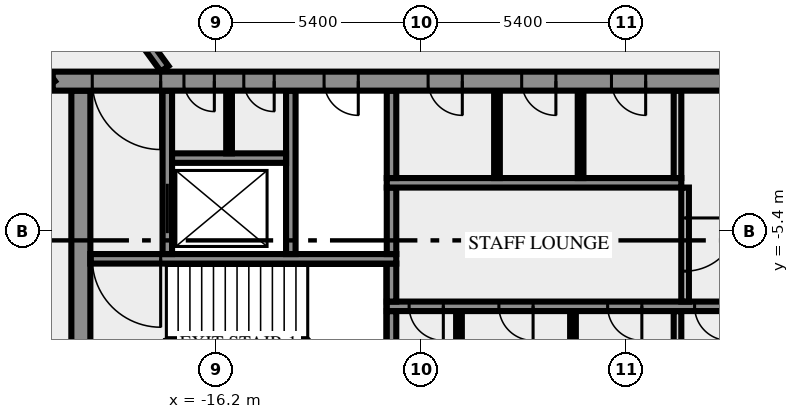
"""IFC4 building model, lengths in metres.
Left out: names, types, materials, properties, quantities, classifications, styles, units other than length and angle.
Written with IfcOpenShell. Run it as: python <this file> out.ifc"""

import sys

from ifc_helpers import new_model, si_unit, direction, frame, frame_2d, origin, place, context, subcontext, project, spatial, rectangle, extrude, element, fill, save


model = new_model("IFC4")
c1 = context("Model", 3, precision=1e-05, world=origin(), true_north=direction((0.0, 1.0)))
c2 = subcontext(c1, "Body", "Model", "MODEL_VIEW")
j1 = project(units=[si_unit("LENGTHUNIT", "METRE"), si_unit("PLANEANGLEUNIT", "RADIAN")], contexts=[c1])
p1 = place(None, origin())
s1 = spatial("IfcSite", under=j1, at=p1, CompositionType="ELEMENT")
p2 = place(p1, origin())
s2 = spatial("IfcBuilding", under=s1, at=p2, CompositionType="ELEMENT")
p3 = place(p2, frame((0.0, 0.0, 218.0)))
s3 = spatial("IfcBuildingStorey", under=s2, at=p3, CompositionType="ELEMENT", Elevation=218.0)
p4 = place(p3, frame((-19.75, -10.5, 0.0), z_axis=(0.0, 0.0, 1.0), x_axis=(0.0, 1.0, 0.0)))
e1 = element("IfcWall", 1, at=p4, inside=s3, PredefinedType="SHEAR", context=c2, shape_type="SweptSolid", body=[
    extrude(rectangle(XDim=8.8, YDim=0.5, at=frame_2d((4.4, 0.0))), origin(), (0.0, 0.0, 1.0), 3.65),
])
p5 = place(p3, frame((-11.575, -10.5, 0.0), z_axis=(0.0, 0.0, 1.0), x_axis=(0.0, 1.0, 0.0)))
e2 = element("IfcWall", 2, at=p5, inside=s3, PredefinedType="SHEAR", context=c2, shape_type="SweptSolid", body=[
    extrude(rectangle(XDim=3.0, YDim=0.25, at=frame_2d((1.5, 0.0))), origin(), (0.0, 0.0, 1.0), 3.65),
])
for number, where, z_axis, x_axis in (
    (3, (-9.8, -10.5, 0.0), (0.0, 0.0, 1.0), (0.0, 1.0, 0.0)),
    (4, (-6.8, -10.5, 0.0), (0.0, 0.0, 1.0), (0.0, 1.0, 0.0)),
):
    element("IfcWall", number, at=place(p3, frame(where, z_axis=z_axis, x_axis=x_axis)), inside=s3, PredefinedType="PARTITIONING", context=c2, shape_type="SweptSolid", body=[
        extrude(rectangle(XDim=3.0, YDim=0.15, at=frame_2d((1.5, 0.0))), origin(), (0.0, 0.0, 1.0), 3.65),
    ])
p6 = place(p3, frame((-4.05, -10.5, 0.0), z_axis=(0.0, 0.0, 1.0), x_axis=(0.0, 1.0, 0.0)))
e5 = element("IfcWall", 5, at=p6, inside=s3, PredefinedType="SOLIDWALL", context=c2, shape_type="SweptSolid", body=[
    extrude(rectangle(XDim=3.0, YDim=0.2, at=frame_2d((1.5, 0.0))), origin(), (0.0, 0.0, 1.0), 3.65),
])
p7 = place(p3, frame((11.7, -7.375, 0.0), z_axis=(0.0, 0.0, 1.0), x_axis=(-1.0, 0.0, 0.0)))
e6 = element("IfcWall", 6, at=p7, inside=s3, PredefinedType="SHEAR", context=c2, shape_type="SweptSolid", body=[
    extrude(rectangle(XDim=23.4, YDim=0.25, at=frame_2d((11.7, 0.0))), origin(), (0.0, 0.0, 1.0), 3.65),
])
p8 = place(p7, frame((21.912, 0.0, 0.0)))
e7 = element("IfcOpeningElement", 7, at=p8, cuts=e6, PredefinedType="OPENING", context=c2, shape_type="SweptSolid", body=[
    extrude(rectangle(XDim=0.9, YDim=2.1, at=frame_2d((0.45, 1.05))), frame((0.0, 0.135, 0.0), z_axis=(0.0, -1.0, 0.0), x_axis=(1.0, 0.0, 0.0)), (0.0, 0.0, 1.0), 0.27),
])
p9 = place(p7, frame((19.55, 0.0, 0.0)))
e8 = element("IfcOpeningElement", 8, at=p9, cuts=e6, PredefinedType="OPENING", context=c2, shape_type="SweptSolid", body=[
    extrude(rectangle(XDim=0.9, YDim=2.1, at=frame_2d((0.45, 1.05))), frame((0.0, 0.135, 0.0), z_axis=(0.0, -1.0, 0.0), x_axis=(1.0, 0.0, 0.0)), (0.0, 0.0, 1.0), 0.27),
])
p10 = place(p7, frame((16.688, 0.0, 0.0)))
e9 = element("IfcOpeningElement", 9, at=p10, cuts=e6, PredefinedType="OPENING", context=c2, shape_type="SweptSolid", body=[
    extrude(rectangle(XDim=0.9, YDim=2.1, at=frame_2d((0.45, 1.05))), frame((0.0, 0.135, 0.0), z_axis=(0.0, -1.0, 0.0), x_axis=(1.0, 0.0, 0.0)), (0.0, 0.0, 1.0), 0.27),
])
p11 = place(p7, frame((14.4, 0.0, 0.0)))
e10 = element("IfcOpeningElement", 10, at=p11, cuts=e6, PredefinedType="OPENING", context=c2, shape_type="SweptSolid", body=[
    extrude(rectangle(XDim=0.9, YDim=2.1, at=frame_2d((0.45, 1.05))), frame((0.0, 0.135, 0.0), z_axis=(0.0, -1.0, 0.0), x_axis=(1.0, 0.0, 0.0)), (0.0, 0.0, 1.0), 0.27),
])
p12 = place(p7, frame((12.5, 0.0, 0.0)))
e11 = element("IfcOpeningElement", 11, at=p12, cuts=e6, PredefinedType="OPENING", context=c2, shape_type="SweptSolid", body=[
    extrude(rectangle(XDim=0.9, YDim=2.1, at=frame_2d((0.45, 1.05))), frame((0.0, 0.135, 0.0), z_axis=(0.0, -1.0, 0.0), x_axis=(1.0, 0.0, 0.0)), (0.0, 0.0, 1.0), 0.27),
])
p13 = place(p7, frame((10.6, 0.0, 0.0)))
e12 = element("IfcOpeningElement", 12, at=p13, cuts=e6, PredefinedType="OPENING", context=c2, shape_type="SweptSolid", body=[
    extrude(rectangle(XDim=0.9, YDim=2.1, at=frame_2d((0.45, 1.05))), frame((0.0, 0.135, 0.0), z_axis=(0.0, -1.0, 0.0), x_axis=(1.0, 0.0, 0.0)), (0.0, 0.0, 1.0), 0.27),
])
p14 = place(p7, frame((8.35, 0.0, 0.0)))
e13 = element("IfcOpeningElement", 13, at=p14, cuts=e6, PredefinedType="OPENING", context=c2, shape_type="SweptSolid", body=[
    extrude(rectangle(XDim=1.1, YDim=2.1, at=frame_2d((0.55, 1.05))), frame((0.0, 0.135, 0.0), z_axis=(0.0, -1.0, 0.0), x_axis=(1.0, 0.0, 0.0)), (0.0, 0.0, 1.0), 0.27),
])
p15 = place(p7, frame((5.85, 0.0, 0.0)))
e14 = element("IfcOpeningElement", 14, at=p15, cuts=e6, PredefinedType="OPENING", context=c2, shape_type="SweptSolid", body=[
    extrude(rectangle(XDim=1.1, YDim=2.1, at=frame_2d((0.55, 1.05))), frame((0.0, 0.135, 0.0), z_axis=(0.0, -1.0, 0.0), x_axis=(1.0, 0.0, 0.0)), (0.0, 0.0, 1.0), 0.27),
])
p16 = place(p7, frame((3.35, 0.0, 0.0)))
e15 = element("IfcOpeningElement", 15, at=p16, cuts=e6, PredefinedType="OPENING", context=c2, shape_type="SweptSolid", body=[
    extrude(rectangle(XDim=1.1, YDim=2.1, at=frame_2d((0.55, 1.05))), frame((0.0, 0.135, 0.0), z_axis=(0.0, -1.0, 0.0), x_axis=(1.0, 0.0, 0.0)), (0.0, 0.0, 1.0), 0.27),
])
p17 = place(p7, frame((0.85, 0.0, 0.0)))
e16 = element("IfcOpeningElement", 16, at=p17, cuts=e6, PredefinedType="OPENING", context=c2, shape_type="SweptSolid", body=[
    extrude(rectangle(XDim=1.1, YDim=2.1, at=frame_2d((0.55, 1.05))), frame((0.0, 0.135, 0.0), z_axis=(0.0, -1.0, 0.0), x_axis=(1.0, 0.0, 0.0)), (0.0, 0.0, 1.0), 0.27),
])
p18 = place(p3, frame((-11.575, -7.25, 0.0), z_axis=(0.0, 0.0, 1.0), x_axis=(0.0, 1.0, 0.0)))
e17 = element("IfcWall", 17, at=p18, inside=s3, PredefinedType="SHEAR", context=c2, shape_type="SweptSolid", body=[
    extrude(rectangle(XDim=1.0, YDim=0.25, at=frame_2d((0.5, 0.0))), origin(), (0.0, 0.0, 1.0), 3.65),
])
p19 = place(p3, frame((-3.85, -4.25, 0.0), z_axis=(0.0, 0.0, 1.0), x_axis=(0.0, -1.0, 0.0)))
e18 = element("IfcWall", 18, at=p19, inside=s3, PredefinedType="SOLIDWALL", context=c2, shape_type="SweptSolid", body=[
    extrude(rectangle(XDim=3.0, YDim=0.2, at=frame_2d((1.5, 0.0))), origin(), (0.0, 0.0, 1.0), 3.65),
])
p20 = place(p19, frame((0.8, 0.0, 0.0)))
e19 = element("IfcOpeningElement", 19, at=p20, cuts=e18, PredefinedType="OPENING", context=c2, shape_type="SweptSolid", body=[
    extrude(rectangle(XDim=1.4, YDim=2.1, at=frame_2d((0.7, 1.05))), frame((0.0, 0.11, 0.0), z_axis=(0.0, -1.0, 0.0), x_axis=(1.0, 0.0, 0.0)), (0.0, 0.0, 1.0), 0.22),
])
p21 = place(p3, frame((-11.45, -6.125, 0.0), z_axis=(0.0, 0.0, 1.0), x_axis=(-1.0, 0.0, 0.0)))
e20 = element("IfcWall", 20, at=p21, inside=s3, PredefinedType="SHEAR", context=c2, shape_type="SweptSolid", body=[
    extrude(rectangle(XDim=8.05, YDim=0.25, at=frame_2d((4.025, 0.0))), origin(), (0.0, 0.0, 1.0), 3.65),
])
p22 = place(p21, frame((6.2, 0.0, 0.0)))
e21 = element("IfcOpeningElement", 21, at=p22, cuts=e20, PredefinedType="OPENING", context=c2, shape_type="SweptSolid", body=[
    extrude(rectangle(XDim=1.8, YDim=2.1, at=frame_2d((0.9, 1.05))), frame((0.0, 0.135, 0.0), z_axis=(0.0, -1.0, 0.0), x_axis=(1.0, 0.0, 0.0)), (0.0, 0.0, 1.0), 0.27),
])
p23 = place(p3, frame((-17.475, -6.0, 0.0), z_axis=(0.0, 0.0, 1.0), x_axis=(0.0, 1.0, 0.0)))
e22 = element("IfcWall", 22, at=p23, inside=s3, PredefinedType="SHEAR", context=c2, shape_type="SweptSolid", body=[
    extrude(rectangle(XDim=4.3, YDim=0.25, at=frame_2d((2.15, 0.0))), origin(), (0.0, 0.0, 1.0), 3.65),
])
p24 = place(p23, frame((0.55, 0.0, 0.0)))
e23 = element("IfcOpeningElement", 23, at=p24, cuts=e22, PredefinedType="OPENING", context=c2, shape_type="SweptSolid", body=[
    extrude(rectangle(XDim=1.3, YDim=2.1, at=frame_2d((0.65, 1.05))), frame((0.0, 0.135, 0.0), z_axis=(0.0, -1.0, 0.0), x_axis=(1.0, 0.0, 0.0)), (0.0, 0.0, 1.0), 0.27),
])
p25 = place(p3, frame((-14.225, -6.0, 0.0), z_axis=(0.0, 0.0, 1.0), x_axis=(0.0, 1.0, 0.0)))
e24 = element("IfcWall", 24, at=p25, inside=s3, PredefinedType="SHEAR", context=c2, shape_type="SweptSolid", body=[
    extrude(rectangle(XDim=4.3, YDim=0.25, at=frame_2d((2.15, 0.0))), origin(), (0.0, 0.0, 1.0), 3.65),
])
p26 = place(p3, frame((-11.575, -6.0, 0.0), z_axis=(0.0, 0.0, 1.0), x_axis=(0.0, 1.0, 0.0)))
e25 = element("IfcWall", 25, at=p26, inside=s3, PredefinedType="SHEAR", context=c2, shape_type="SweptSolid", body=[
    extrude(rectangle(XDim=1.75, YDim=0.25, at=frame_2d((0.875, 0.0))), origin(), (0.0, 0.0, 1.0), 3.65),
])
p27 = place(p3, frame((-11.7, -4.125, 0.0), z_axis=(0.0, 0.0, 1.0), x_axis=(1.0, 0.0, 0.0)))
e26 = element("IfcWall", 26, at=p27, inside=s3, PredefinedType="SHEAR", context=c2, shape_type="SweptSolid", body=[
    extrude(rectangle(XDim=7.75, YDim=0.25, at=frame_2d((3.875, 0.0))), origin(), (0.0, 0.0, 1.0), 3.65),
])
p28 = place(p3, frame((-11.575, -4.0, 0.0), z_axis=(0.0, 0.0, 1.0), x_axis=(0.0, 1.0, 0.0)))
e27 = element("IfcWall", 27, at=p28, inside=s3, PredefinedType="SHEAR", context=c2, shape_type="SweptSolid", body=[
    extrude(rectangle(XDim=2.3, YDim=0.25, at=frame_2d((1.15, 0.0))), origin(), (0.0, 0.0, 1.0), 3.65),
])
for number, where, z_axis, x_axis in (
    (28, (-8.8, -4.0, 0.0), (0.0, 0.0, 1.0), (0.0, 1.0, 0.0)),
    (29, (-6.6, -4.0, 0.0), (0.0, 0.0, 1.0), (0.0, 1.0, 0.0)),
):
    element("IfcWall", number, at=place(p3, frame(where, z_axis=z_axis, x_axis=x_axis)), inside=s3, PredefinedType="PARTITIONING", context=c2, shape_type="SweptSolid", body=[
        extrude(rectangle(XDim=2.3, YDim=0.15, at=frame_2d((1.15, 0.0))), origin(), (0.0, 0.0, 1.0), 3.65),
    ])
p29 = place(p3, frame((-4.05, -4.0, 0.0), z_axis=(0.0, 0.0, 1.0), x_axis=(0.0, 1.0, 0.0)))
e30 = element("IfcWall", 30, at=p29, inside=s3, PredefinedType="SOLIDWALL", context=c2, shape_type="SweptSolid", body=[
    extrude(rectangle(XDim=2.3, YDim=0.2, at=frame_2d((1.15, 0.0))), origin(), (0.0, 0.0, 1.0), 3.65),
])
p30 = place(p3, frame((-17.35, -3.475, 0.0), z_axis=(0.0, 0.0, 1.0), x_axis=(1.0, 0.0, 0.0)))
e31 = element("IfcWall", 31, at=p30, inside=s3, PredefinedType="SHEAR", context=c2, shape_type="SweptSolid", body=[
    extrude(rectangle(XDim=3.0, YDim=0.25, at=frame_2d((1.5, 0.0))), origin(), (0.0, 0.0, 1.0), 3.65),
])
p31 = place(p3, frame((-15.85, -3.35, 0.0), z_axis=(0.0, 0.0, 1.0), x_axis=(0.0, 1.0, 0.0)))
e32 = element("IfcWall", 32, at=p31, inside=s3, PredefinedType="PARTITIONING", context=c2, shape_type="SweptSolid", body=[
    extrude(rectangle(XDim=1.65, YDim=0.15, at=frame_2d((0.825, 0.0))), origin(), (0.0, 0.0, 1.0), 3.65),
])
p32 = place(p3, frame((20.49, -1.45, 0.0), z_axis=(0.0, 0.0, 1.0), x_axis=(-1.0, 0.0, 0.0)))
e33 = element("IfcWall", 33, at=p32, inside=s3, PredefinedType="SHEAR", context=c2, shape_type="SweptSolid", body=[
    extrude(rectangle(XDim=40.98, YDim=0.5, at=frame_2d((20.49, 0.0))), origin(), (0.0, 0.0, 1.0), 3.65),
])
p33 = place(p32, frame((38.14, 0.0, 0.0)))
e34 = element("IfcOpeningElement", 34, at=p33, cuts=e33, PredefinedType="OPENING", context=c2, shape_type="SweptSolid", body=[
    extrude(rectangle(XDim=1.8, YDim=2.1, at=frame_2d((0.9, 1.05))), frame((0.0, 0.26, 0.0), z_axis=(0.0, -1.0, 0.0), x_axis=(1.0, 0.0, 0.0)), (0.0, 0.0, 1.0), 0.52),
])
p34 = place(p32, frame((36.728, 0.0, 0.0)))
e35 = element("IfcOpeningElement", 35, at=p34, cuts=e33, PredefinedType="OPENING", context=c2, shape_type="SweptSolid", body=[
    extrude(rectangle(XDim=0.8, YDim=2.1, at=frame_2d((0.4, 1.05))), frame((0.0, 0.26, 0.0), z_axis=(0.0, -1.0, 0.0), x_axis=(1.0, 0.0, 0.0)), (0.0, 0.0, 1.0), 0.52),
])
p35 = place(p32, frame((35.153, 0.0, 0.0)))
e36 = element("IfcOpeningElement", 36, at=p35, cuts=e33, PredefinedType="OPENING", context=c2, shape_type="SweptSolid", body=[
    extrude(rectangle(XDim=0.8, YDim=2.1, at=frame_2d((0.4, 1.05))), frame((0.0, 0.26, 0.0), z_axis=(0.0, -1.0, 0.0), x_axis=(1.0, 0.0, 0.0)), (0.0, 0.0, 1.0), 0.52),
])
p36 = place(p32, frame((32.94, 0.0, 0.0)))
e37 = element("IfcOpeningElement", 37, at=p36, cuts=e33, PredefinedType="OPENING", context=c2, shape_type="SweptSolid", body=[
    extrude(rectangle(XDim=0.9, YDim=2.1, at=frame_2d((0.45, 1.05))), frame((0.0, 0.26, 0.0), z_axis=(0.0, -1.0, 0.0), x_axis=(1.0, 0.0, 0.0)), (0.0, 0.0, 1.0), 0.52),
])
p37 = place(p32, frame((30.202, 0.0, 0.0)))
e38 = element("IfcOpeningElement", 38, at=p37, cuts=e33, PredefinedType="OPENING", context=c2, shape_type="SweptSolid", body=[
    extrude(rectangle(XDim=0.9, YDim=2.1, at=frame_2d((0.45, 1.05))), frame((0.0, 0.26, 0.0), z_axis=(0.0, -1.0, 0.0), x_axis=(1.0, 0.0, 0.0)), (0.0, 0.0, 1.0), 0.52),
])
p38 = place(p32, frame((27.74, 0.0, 0.0)))
e39 = element("IfcOpeningElement", 39, at=p38, cuts=e33, PredefinedType="OPENING", context=c2, shape_type="SweptSolid", body=[
    extrude(rectangle(XDim=0.9, YDim=2.1, at=frame_2d((0.45, 1.05))), frame((0.0, 0.26, 0.0), z_axis=(0.0, -1.0, 0.0), x_axis=(1.0, 0.0, 0.0)), (0.0, 0.0, 1.0), 0.52),
])
p39 = place(p32, frame((25.377, 0.0, 0.0)))
e40 = element("IfcOpeningElement", 40, at=p39, cuts=e33, PredefinedType="OPENING", context=c2, shape_type="SweptSolid", body=[
    extrude(rectangle(XDim=0.9, YDim=2.1, at=frame_2d((0.45, 1.05))), frame((0.0, 0.26, 0.0), z_axis=(0.0, -1.0, 0.0), x_axis=(1.0, 0.0, 0.0)), (0.0, 0.0, 1.0), 0.52),
])
p40 = place(p32, frame((20.74, 0.0, 0.0)))
e41 = element("IfcOpeningElement", 41, at=p40, cuts=e33, PredefinedType="OPENING", context=c2, shape_type="SweptSolid", body=[
    extrude(rectangle(XDim=2.0, YDim=2.1, at=frame_2d((1.0, 1.05))), frame((0.0, 0.26, 0.0), z_axis=(0.0, -1.0, 0.0), x_axis=(1.0, 0.0, 0.0)), (0.0, 0.0, 1.0), 0.52),
])
p41 = place(p32, frame((7.14, 0.0, 0.0)))
e42 = element("IfcOpeningElement", 42, at=p41, cuts=e33, PredefinedType="OPENING", context=c2, shape_type="SweptSolid", body=[
    extrude(rectangle(XDim=0.9, YDim=2.1, at=frame_2d((0.45, 1.05))), frame((0.0, 0.26, 0.0), z_axis=(0.0, -1.0, 0.0), x_axis=(1.0, 0.0, 0.0)), (0.0, 0.0, 1.0), 0.52),
])
p42 = place(p32, frame((4.19, 0.0, 0.0)))
e43 = element("IfcOpeningElement", 43, at=p42, cuts=e33, PredefinedType="OPENING", context=c2, shape_type="SweptSolid", body=[
    extrude(rectangle(XDim=0.9, YDim=2.1, at=frame_2d((0.45, 1.05))), frame((0.0, 0.26, 0.0), z_axis=(0.0, -1.0, 0.0), x_axis=(1.0, 0.0, 0.0)), (0.0, 0.0, 1.0), 0.52),
])
p43 = place(p32, frame((1.04, 0.0, 0.0)))
e44 = element("IfcOpeningElement", 44, at=p43, cuts=e33, PredefinedType="OPENING", context=c2, shape_type="SweptSolid", body=[
    extrude(rectangle(XDim=1.8, YDim=2.1, at=frame_2d((0.9, 1.05))), frame((0.0, 0.26, 0.0), z_axis=(0.0, -1.0, 0.0), x_axis=(1.0, 0.0, 0.0)), (0.0, 0.0, 1.0), 0.52),
])
p44 = place(p3, frame((-20.531, -1.523, 0.0), z_axis=(0.0, 0.0, 1.0), x_axis=(-0.587784239999, 0.809017729849, 0.0)))
e45 = element("IfcWall", 45, at=p44, inside=s3, PredefinedType="SOLIDWALL", context=c2, shape_type="SweptSolid", body=[
    extrude(rectangle(XDim=23.271, YDim=0.25, at=frame_2d((11.635, 0.0))), origin(), (0.0, 0.0, 1.0), 3.65),
])
p45 = place(p44, frame((0.533, 0.0, 0.0)))
e46 = element("IfcOpeningElement", 46, at=p45, cuts=e45, PredefinedType="OPENING", context=c2, shape_type="SweptSolid", body=[
    extrude(rectangle(XDim=0.9, YDim=2.1, at=frame_2d((0.45, 1.05))), frame((0.0, 0.135, 0.0), z_axis=(0.0, -1.0, 0.0), x_axis=(1.0, 0.0, 0.0)), (0.0, 0.0, 1.0), 0.27),
])
p46 = place(p44, frame((17.106, 0.0, 0.0)))
e47 = element("IfcOpeningElement", 47, at=p46, cuts=e45, PredefinedType="OPENING", context=c2, shape_type="SweptSolid", body=[
    extrude(rectangle(XDim=1.8, YDim=2.1, at=frame_2d((0.9, 1.05))), frame((0.0, 0.135, 0.0), z_axis=(0.0, -1.0, 0.0), x_axis=(1.0, 0.0, 0.0)), (0.0, 0.0, 1.0), 0.27),
])
p47 = place(p44, frame((10.516, 0.0, 0.0)))
e48 = element("IfcOpeningElement", 48, at=p47, cuts=e45, PredefinedType="OPENING", context=c2, shape_type="SweptSolid", body=[
    extrude(rectangle(XDim=0.9, YDim=2.1, at=frame_2d((0.45, 1.05))), frame((0.0, 0.135, 0.0), z_axis=(0.0, -1.0, 0.0), x_axis=(1.0, 0.0, 0.0)), (0.0, 0.0, 1.0), 0.27),
])
p48 = place(p3, frame((-31.918, 18.658, 0.0), z_axis=(0.0, 0.0, 1.0), x_axis=(0.587788731405, -0.80901446664, 0.0)))
e49 = element("IfcWall", 49, at=p48, inside=s3, PredefinedType="SOLIDWALL", context=c2, shape_type="SweptSolid", body=[
    extrude(rectangle(XDim=24.453, YDim=0.25, at=frame_2d((12.227, 0.0))), origin(), (0.0, 0.0, 1.0), 3.65),
])
p49 = place(p48, frame((8.395, 0.0, 0.0)))
e50 = element("IfcOpeningElement", 50, at=p49, cuts=e49, PredefinedType="OPENING", context=c2, shape_type="SweptSolid", body=[
    extrude(rectangle(XDim=1.0, YDim=2.1, at=frame_2d((0.5, 1.05))), frame((0.0, 0.135, 0.0), z_axis=(0.0, -1.0, 0.0), x_axis=(1.0, 0.0, 0.0)), (0.0, 0.0, 1.0), 0.27),
])
p50 = place(p48, frame((10.095, 0.0, 0.0)))
e51 = element("IfcOpeningElement", 51, at=p50, cuts=e49, PredefinedType="OPENING", context=c2, shape_type="SweptSolid", body=[
    extrude(rectangle(XDim=0.9, YDim=2.1, at=frame_2d((0.45, 1.05))), frame((0.0, 0.135, 0.0), z_axis=(0.0, -1.0, 0.0), x_axis=(1.0, 0.0, 0.0)), (0.0, 0.0, 1.0), 0.27),
])
p51 = place(p8, origin())
e52 = element("IfcDoor", 52, at=p51, inside=s3, OperationType="SINGLE_SWING_RIGHT", PredefinedType="DOOR", context=c2, shape_type="SweptSolid", body=[
    extrude(rectangle(XDim=0.9, YDim=2.1, at=frame_2d((0.45, 1.05))), frame((0.0, 0.025, 0.0), z_axis=(0.0, -1.0, 0.0), x_axis=(1.0, 0.0, 0.0)), (0.0, 0.0, 1.0), 0.05),
])
fill(e7, e52)
p52 = place(p9, origin())
e53 = element("IfcDoor", 53, at=p52, inside=s3, OperationType="SINGLE_SWING_RIGHT", PredefinedType="DOOR", context=c2, shape_type="SweptSolid", body=[
    extrude(rectangle(XDim=0.9, YDim=2.1, at=frame_2d((0.45, 1.05))), frame((0.0, 0.025, 0.0), z_axis=(0.0, -1.0, 0.0), x_axis=(1.0, 0.0, 0.0)), (0.0, 0.0, 1.0), 0.05),
])
fill(e8, e53)
p53 = place(p10, origin())
e54 = element("IfcDoor", 54, at=p53, inside=s3, OperationType="SINGLE_SWING_RIGHT", PredefinedType="DOOR", context=c2, shape_type="SweptSolid", body=[
    extrude(rectangle(XDim=0.9, YDim=2.1, at=frame_2d((0.45, 1.05))), frame((0.0, 0.025, 0.0), z_axis=(0.0, -1.0, 0.0), x_axis=(1.0, 0.0, 0.0)), (0.0, 0.0, 1.0), 0.05),
])
fill(e9, e54)
p54 = place(p11, origin())
e55 = element("IfcDoor", 55, at=p54, inside=s3, OperationType="SINGLE_SWING_RIGHT", PredefinedType="DOOR", context=c2, shape_type="SweptSolid", body=[
    extrude(rectangle(XDim=0.9, YDim=2.1, at=frame_2d((0.45, 1.05))), frame((0.0, 0.025, 0.0), z_axis=(0.0, -1.0, 0.0), x_axis=(1.0, 0.0, 0.0)), (0.0, 0.0, 1.0), 0.05),
])
fill(e10, e55)
p55 = place(p20, origin())
e56 = element("IfcDoor", 56, at=p55, inside=s3, OperationType="DOUBLE_DOOR_SINGLE_SWING", PredefinedType="DOOR", context=c2, shape_type="SweptSolid", body=[
    extrude(rectangle(XDim=1.4, YDim=2.1, at=frame_2d((0.7, 1.05))), frame((0.0, 0.025, 0.0), z_axis=(0.0, -1.0, 0.0), x_axis=(1.0, 0.0, 0.0)), (0.0, 0.0, 1.0), 0.05),
])
fill(e19, e56)
p56 = place(p22, origin())
e57 = element("IfcDoor", 57, at=p56, inside=s3, OperationType="DOUBLE_DOOR_SINGLE_SWING", PredefinedType="DOOR", context=c2, shape_type="SweptSolid", body=[
    extrude(rectangle(XDim=1.8, YDim=2.1, at=frame_2d((0.9, 1.05))), frame((0.0, 0.025, 0.0), z_axis=(0.0, -1.0, 0.0), x_axis=(1.0, 0.0, 0.0)), (0.0, 0.0, 1.0), 0.05),
])
fill(e21, e57)
p57 = place(p24, origin())
e58 = element("IfcDoor", 58, at=p57, inside=s3, OperationType="DOUBLE_DOOR_SLIDING", PredefinedType="DOOR", context=c2, shape_type="SweptSolid", body=[
    extrude(rectangle(XDim=1.3, YDim=2.1, at=frame_2d((0.65, 1.05))), frame((0.0, 0.025, 0.0), z_axis=(0.0, -1.0, 0.0), x_axis=(1.0, 0.0, 0.0)), (0.0, 0.0, 1.0), 0.05),
])
fill(e23, e58)
p58 = place(p33, origin())
e59 = element("IfcDoor", 59, at=p58, inside=s3, OperationType="DOUBLE_DOOR_SINGLE_SWING", PredefinedType="DOOR", context=c2, shape_type="SweptSolid", body=[
    extrude(rectangle(XDim=1.8, YDim=2.1, at=frame_2d((0.9, 1.05))), frame((0.0, 0.025, 0.0), z_axis=(0.0, -1.0, 0.0), x_axis=(1.0, 0.0, 0.0)), (0.0, 0.0, 1.0), 0.05),
])
fill(e34, e59)
p59 = place(p34, origin())
e60 = element("IfcDoor", 60, at=p59, inside=s3, OperationType="SINGLE_SWING_RIGHT", PredefinedType="DOOR", context=c2, shape_type="SweptSolid", body=[
    extrude(rectangle(XDim=0.8, YDim=2.1, at=frame_2d((0.4, 1.05))), frame((0.0, 0.025, 0.0), z_axis=(0.0, -1.0, 0.0), x_axis=(1.0, 0.0, 0.0)), (0.0, 0.0, 1.0), 0.05),
])
fill(e35, e60)
p60 = place(p35, origin())
e61 = element("IfcDoor", 61, at=p60, inside=s3, OperationType="SINGLE_SWING_RIGHT", PredefinedType="DOOR", context=c2, shape_type="SweptSolid", body=[
    extrude(rectangle(XDim=0.8, YDim=2.1, at=frame_2d((0.4, 1.05))), frame((0.0, 0.025, 0.0), z_axis=(0.0, -1.0, 0.0), x_axis=(1.0, 0.0, 0.0)), (0.0, 0.0, 1.0), 0.05),
])
fill(e36, e61)
p61 = place(p36, origin())
e62 = element("IfcDoor", 62, at=p61, inside=s3, OperationType="SINGLE_SWING_RIGHT", PredefinedType="DOOR", context=c2, shape_type="SweptSolid", body=[
    extrude(rectangle(XDim=0.9, YDim=2.1, at=frame_2d((0.45, 1.05))), frame((0.0, 0.025, 0.0), z_axis=(0.0, -1.0, 0.0), x_axis=(1.0, 0.0, 0.0)), (0.0, 0.0, 1.0), 0.05),
])
fill(e37, e62)
p62 = place(p37, origin())
e63 = element("IfcDoor", 63, at=p62, inside=s3, OperationType="SINGLE_SWING_RIGHT", PredefinedType="DOOR", context=c2, shape_type="SweptSolid", body=[
    extrude(rectangle(XDim=0.9, YDim=2.1, at=frame_2d((0.45, 1.05))), frame((0.0, 0.025, 0.0), z_axis=(0.0, -1.0, 0.0), x_axis=(1.0, 0.0, 0.0)), (0.0, 0.0, 1.0), 0.05),
])
fill(e38, e63)
p63 = place(p38, origin())
e64 = element("IfcDoor", 64, at=p63, inside=s3, OperationType="SINGLE_SWING_RIGHT", PredefinedType="DOOR", context=c2, shape_type="SweptSolid", body=[
    extrude(rectangle(XDim=0.9, YDim=2.1, at=frame_2d((0.45, 1.05))), frame((0.0, 0.025, 0.0), z_axis=(0.0, -1.0, 0.0), x_axis=(1.0, 0.0, 0.0)), (0.0, 0.0, 1.0), 0.05),
])
fill(e39, e64)
p64 = place(p39, origin())
e65 = element("IfcDoor", 65, at=p64, inside=s3, OperationType="SINGLE_SWING_RIGHT", PredefinedType="DOOR", context=c2, shape_type="SweptSolid", body=[
    extrude(rectangle(XDim=0.9, YDim=2.1, at=frame_2d((0.45, 1.05))), frame((0.0, 0.025, 0.0), z_axis=(0.0, -1.0, 0.0), x_axis=(1.0, 0.0, 0.0)), (0.0, 0.0, 1.0), 0.05),
])
fill(e40, e65)
save(model, sys.argv[1])
